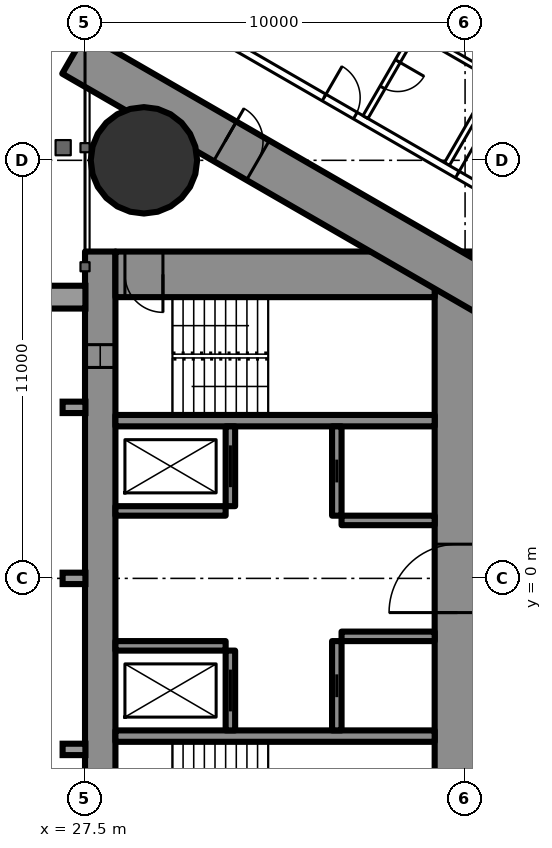
"""IFC4 building model, lengths in metres.
Left out: names, types, materials, properties, quantities, classifications, styles, units other than length and angle.
Written with IfcOpenShell. Run it as: python <this file> out.ifc"""

import sys

from ifc_helpers import new_model, si_unit, direction, frame, frame_2d, origin, origin_2d, place, context, subcontext, project, spatial, rectangle, circle, extrude, element, fill, save


model = new_model("IFC4")
c1 = context("Model", 3, precision=1e-05, world=origin(), true_north=direction((0.0, 1.0)))
c2 = subcontext(c1, "Body", "Model", "MODEL_VIEW")
j1 = project(units=[si_unit("LENGTHUNIT", "METRE"), si_unit("PLANEANGLEUNIT", "RADIAN")], contexts=[c1])
p1 = place(None, origin())
s1 = spatial("IfcSite", under=j1, at=p1, CompositionType="ELEMENT")
p2 = place(p1, origin())
s2 = spatial("IfcBuilding", under=s1, at=p2, CompositionType="ELEMENT")
p3 = place(p2, frame((0.0, 0.0, 184.3)))
s3 = spatial("IfcBuildingStorey", under=s2, at=p3, CompositionType="ELEMENT", Elevation=184.3)
p4 = place(p3, frame((29.05, 11.0, 0.0), z_axis=(0.0, 0.0, 1.0), x_axis=(1.0, 0.0, 0.0)))
e1 = element("IfcColumn", 1, at=p4, inside=s3, PredefinedType="COLUMN", context=c2, shape_type="SweptSolid", body=[
    extrude(circle(Radius=1.4, at=origin_2d()), origin(), (0.0, 0.0, 1.0), 3.5),
])
p5 = place(p3, frame((27.9, -8.6, 0.0), z_axis=(0.0, 0.0, 1.0), x_axis=(0.0, 1.0, 0.0)))
e2 = element("IfcWall", 2, at=p5, inside=s3, PredefinedType="SHEAR", context=c2, shape_type="SweptSolid", body=[
    extrude(rectangle(XDim=17.2, YDim=0.8, at=frame_2d((8.6, 0.0))), origin(), (0.0, 0.0, 1.0), 3.5),
])
p6 = place(p5, frame((2.45, 0.0, 0.6)))
e3 = element("IfcOpeningElement", 3, at=p6, cuts=e2, PredefinedType="OPENING", context=c2, shape_type="SweptSolid", body=[
    extrude(rectangle(XDim=0.6, YDim=2.1, at=frame_2d((0.3, 1.05))), frame((0.0, 0.41, 0.0), z_axis=(0.0, -1.0, 0.0), x_axis=(1.0, 0.0, 0.0)), (0.0, 0.0, 1.0), 0.82),
])
p7 = place(p5, frame((14.15, 0.0, 0.6)))
e4 = element("IfcOpeningElement", 4, at=p7, cuts=e2, PredefinedType="OPENING", context=c2, shape_type="SweptSolid", body=[
    extrude(rectangle(XDim=0.6, YDim=2.1, at=frame_2d((0.3, 1.05))), frame((0.0, 0.41, 0.0), z_axis=(0.0, -1.0, 0.0), x_axis=(1.0, 0.0, 0.0)), (0.0, 0.0, 1.0), 0.82),
])
p8 = place(p3, frame((37.3, -8.6, 0.0), z_axis=(0.0, 0.0, 1.0), x_axis=(0.0, 1.0, 0.0)))
e5 = element("IfcWall", 5, at=p8, inside=s3, PredefinedType="SHEAR", context=c2, shape_type="SweptSolid", body=[
    extrude(rectangle(XDim=17.2, YDim=1.2, at=frame_2d((8.6, 0.0))), origin(), (0.0, 0.0, 1.0), 3.5),
])
p9 = place(p8, frame((7.7, 0.0, 0.0)))
e6 = element("IfcOpeningElement", 6, at=p9, cuts=e5, PredefinedType="OPENING", context=c2, shape_type="SweptSolid", body=[
    extrude(rectangle(XDim=1.8, YDim=2.2, at=frame_2d((0.9, 1.1))), frame((0.0, 0.61, 0.0), z_axis=(0.0, -1.0, 0.0), x_axis=(1.0, 0.0, 0.0)), (0.0, 0.0, 1.0), 1.22),
])
p10 = place(p3, frame((28.3, 8.0, 0.0), z_axis=(0.0, 0.0, 1.0), x_axis=(1.0, 0.0, 0.0)))
e7 = element("IfcWall", 7, at=p10, inside=s3, PredefinedType="SHEAR", context=c2, shape_type="SweptSolid", body=[
    extrude(rectangle(XDim=8.4, YDim=1.2, at=frame_2d((4.2, 0.0))), origin(), (0.0, 0.0, 1.0), 3.5),
])
p11 = place(p10, frame((0.25, 0.0, 0.0)))
e8 = element("IfcOpeningElement", 8, at=p11, cuts=e7, PredefinedType="OPENING", context=c2, shape_type="SweptSolid", body=[
    extrude(rectangle(XDim=1.0, YDim=2.2, at=frame_2d((0.5, 1.1))), frame((0.0, 0.61, 0.0), z_axis=(0.0, -1.0, 0.0), x_axis=(1.0, 0.0, 0.0)), (0.0, 0.0, 1.0), 1.22),
])
for number, where, z_axis, x_axis in (
    (9, (28.3, -4.15, 0.0), (0.0, 0.0, 1.0), (1.0, 0.0, 0.0)),
    (10, (28.3, 4.15, 0.0), (0.0, 0.0, 1.0), (1.0, 0.0, 0.0)),
):
    element("IfcWall", number, at=place(p3, frame(where, z_axis=z_axis, x_axis=x_axis)), inside=s3, PredefinedType="SHEAR", context=c2, shape_type="SweptSolid", body=[
        extrude(rectangle(XDim=8.4, YDim=0.3, at=frame_2d((4.2, 0.0))), origin(), (0.0, 0.0, 1.0), 3.5),
    ])
p12 = place(p3, frame((31.325, -4.0, 0.0), z_axis=(0.0, 0.0, 1.0), x_axis=(0.0, 1.0, 0.0)))
e11 = element("IfcWall", 11, at=p12, inside=s3, PredefinedType="SHEAR", context=c2, shape_type="SweptSolid", body=[
    extrude(rectangle(XDim=2.1, YDim=0.25, at=frame_2d((1.05, 0.0))), origin(), (0.0, 0.0, 1.0), 3.5),
])
p13 = place(p12, frame((0.5, 0.0, 0.0)))
e12 = element("IfcOpeningElement", 12, at=p13, cuts=e11, PredefinedType="OPENING", context=c2, shape_type="SweptSolid", body=[
    extrude(rectangle(XDim=1.1, YDim=2.2, at=frame_2d((0.55, 1.1))), frame((0.0, 0.135, 0.0), z_axis=(0.0, -1.0, 0.0), x_axis=(1.0, 0.0, 0.0)), (0.0, 0.0, 1.0), 0.27),
])
p14 = place(p3, frame((34.125, -4.0, 0.0), z_axis=(0.0, 0.0, 1.0), x_axis=(0.0, 1.0, 0.0)))
e13 = element("IfcWall", 13, at=p14, inside=s3, PredefinedType="SHEAR", context=c2, shape_type="SweptSolid", body=[
    extrude(rectangle(XDim=2.35, YDim=0.25, at=frame_2d((1.175, 0.0))), origin(), (0.0, 0.0, 1.0), 3.5),
])
p15 = place(p14, frame((0.875, 0.0, 0.0)))
e14 = element("IfcOpeningElement", 14, at=p15, cuts=e13, PredefinedType="OPENING", context=c2, shape_type="SweptSolid", body=[
    extrude(rectangle(XDim=0.6, YDim=2.0, at=frame_2d((0.3, 1.0))), frame((0.0, 0.135, 0.0), z_axis=(0.0, -1.0, 0.0), x_axis=(1.0, 0.0, 0.0)), (0.0, 0.0, 1.0), 0.27),
])
p16 = place(p3, frame((28.3, -1.775, 0.0), z_axis=(0.0, 0.0, 1.0), x_axis=(1.0, 0.0, 0.0)))
e15 = element("IfcWall", 15, at=p16, inside=s3, PredefinedType="SHEAR", context=c2, shape_type="SweptSolid", body=[
    extrude(rectangle(XDim=2.9, YDim=0.25, at=frame_2d((1.45, 0.0))), origin(), (0.0, 0.0, 1.0), 3.5),
])
p17 = place(p3, frame((34.25, -1.525, 0.0), z_axis=(0.0, 0.0, 1.0), x_axis=(1.0, 0.0, 0.0)))
e16 = element("IfcWall", 16, at=p17, inside=s3, PredefinedType="SHEAR", context=c2, shape_type="SweptSolid", body=[
    extrude(rectangle(XDim=2.45, YDim=0.25, at=frame_2d((1.225, 0.0))), origin(), (0.0, 0.0, 1.0), 3.5),
])
p18 = place(p3, frame((31.325, 1.9, 0.0), z_axis=(0.0, 0.0, 1.0), x_axis=(0.0, 1.0, 0.0)))
e17 = element("IfcWall", 17, at=p18, inside=s3, PredefinedType="SHEAR", context=c2, shape_type="SweptSolid", body=[
    extrude(rectangle(XDim=2.1, YDim=0.25, at=frame_2d((1.05, 0.0))), origin(), (0.0, 0.0, 1.0), 3.5),
])
p19 = place(p18, frame((0.5, 0.0, 0.0)))
e18 = element("IfcOpeningElement", 18, at=p19, cuts=e17, PredefinedType="OPENING", context=c2, shape_type="SweptSolid", body=[
    extrude(rectangle(XDim=1.1, YDim=2.2, at=frame_2d((0.55, 1.1))), frame((0.0, 0.135, 0.0), z_axis=(0.0, -1.0, 0.0), x_axis=(1.0, 0.0, 0.0)), (0.0, 0.0, 1.0), 0.27),
])
p20 = place(p3, frame((34.125, 1.65, 0.0), z_axis=(0.0, 0.0, 1.0), x_axis=(0.0, 1.0, 0.0)))
e19 = element("IfcWall", 19, at=p20, inside=s3, PredefinedType="SHEAR", context=c2, shape_type="SweptSolid", body=[
    extrude(rectangle(XDim=2.35, YDim=0.25, at=frame_2d((1.175, 0.0))), origin(), (0.0, 0.0, 1.0), 3.5),
])
p21 = place(p20, frame((0.875, 0.0, 0.0)))
e20 = element("IfcOpeningElement", 20, at=p21, cuts=e19, PredefinedType="OPENING", context=c2, shape_type="SweptSolid", body=[
    extrude(rectangle(XDim=0.6, YDim=2.0, at=frame_2d((0.3, 1.0))), frame((0.0, 0.135, 0.0), z_axis=(0.0, -1.0, 0.0), x_axis=(1.0, 0.0, 0.0)), (0.0, 0.0, 1.0), 0.27),
])
p22 = place(p3, frame((28.3, 1.775, 0.0), z_axis=(0.0, 0.0, 1.0), x_axis=(1.0, 0.0, 0.0)))
e21 = element("IfcWall", 21, at=p22, inside=s3, PredefinedType="SHEAR", context=c2, shape_type="SweptSolid", body=[
    extrude(rectangle(XDim=2.9, YDim=0.25, at=frame_2d((1.45, 0.0))), origin(), (0.0, 0.0, 1.0), 3.5),
])
p23 = place(p3, frame((34.25, 1.525, 0.0), z_axis=(0.0, 0.0, 1.0), x_axis=(1.0, 0.0, 0.0)))
e22 = element("IfcWall", 22, at=p23, inside=s3, PredefinedType="SHEAR", context=c2, shape_type="SweptSolid", body=[
    extrude(rectangle(XDim=2.45, YDim=0.25, at=frame_2d((1.225, 0.0))), origin(), (0.0, 0.0, 1.0), 3.5),
])
p24 = place(p3, frame((27.2, -13.8, 0.0), z_axis=(0.0, 0.0, 1.0), x_axis=(0.866027159892, 0.499996958321, 0.0)))
e23 = element("IfcWall", 23, at=p24, inside=s3, PredefinedType="SHEAR", context=c2, shape_type="SweptSolid", body=[
    extrude(rectangle(XDim=27.947, YDim=1.2, at=frame_2d((13.973, 0.0))), origin(), (0.0, 0.0, 1.0), 3.5),
])
p25 = place(p24, frame((4.6, 0.0, 0.0)))
e24 = element("IfcOpeningElement", 24, at=p25, cuts=e23, PredefinedType="OPENING", context=c2, shape_type="SweptSolid", body=[
    extrude(rectangle(XDim=1.0, YDim=2.2, at=frame_2d((0.5, 1.1))), frame((0.0, 0.61, 0.0), z_axis=(0.0, -1.0, 0.0), x_axis=(1.0, 0.0, 0.0)), (0.0, 0.0, 1.0), 1.22),
])
p26 = place(p24, frame((13.395, 0.0, 0.0)))
e25 = element("IfcOpeningElement", 25, at=p26, cuts=e23, PredefinedType="OPENING", context=c2, shape_type="SweptSolid", body=[
    extrude(rectangle(XDim=1.8, YDim=2.2, at=frame_2d((0.9, 1.1))), frame((0.0, 0.61, 0.0), z_axis=(0.0, -1.0, 0.0), x_axis=(1.0, 0.0, 0.0)), (0.0, 0.0, 1.0), 1.22),
])
p27 = place(p3, frame((27.2, 13.8, 0.0), z_axis=(0.0, 0.0, 1.0), x_axis=(0.866024515034, -0.500001539357, 0.0)))
e26 = element("IfcWall", 26, at=p27, inside=s3, PredefinedType="SHEAR", context=c2, shape_type="SweptSolid", body=[
    extrude(rectangle(XDim=26.907, YDim=1.2, at=frame_2d((13.454, 0.0))), origin(), (0.0, 0.0, 1.0), 3.5),
])
p28 = place(p27, frame((4.6, 0.0, 0.0)))
e27 = element("IfcOpeningElement", 27, at=p28, cuts=e26, PredefinedType="OPENING", context=c2, shape_type="SweptSolid", body=[
    extrude(rectangle(XDim=1.0, YDim=2.2, at=frame_2d((0.5, 1.1))), frame((0.0, 0.61, 0.0), z_axis=(0.0, -1.0, 0.0), x_axis=(1.0, 0.0, 0.0)), (0.0, 0.0, 1.0), 1.22),
])
p29 = place(p27, frame((13.395, 0.0, 0.0)))
e28 = element("IfcOpeningElement", 28, at=p29, cuts=e26, PredefinedType="OPENING", context=c2, shape_type="SweptSolid", body=[
    extrude(rectangle(XDim=1.8, YDim=2.2, at=frame_2d((0.9, 1.1))), frame((0.0, 0.61, 0.0), z_axis=(0.0, -1.0, 0.0), x_axis=(1.0, 0.0, 0.0)), (0.0, 0.0, 1.0), 1.22),
])
p30 = place(p3, frame((37.022, 10.9, 0.0), z_axis=(0.0, 0.0, 1.0), x_axis=(0.499998620953, 0.866026199976, 0.0)))
e29 = element("IfcWall", 29, at=p30, inside=s3, PredefinedType="PARTITIONING", context=c2, shape_type="SweptSolid", body=[
    extrude(rectangle(XDim=9.77, YDim=0.15, at=frame_2d((4.885, 0.0))), origin(), (0.0, 0.0, 1.0), 3.25),
])
p31 = place(p3, frame((27.959, 16.017, 0.0), z_axis=(0.0, 0.0, 1.0), x_axis=(0.866027146794, -0.499996981007, 0.0)))
e30 = element("IfcWall", 30, at=p31, inside=s3, PredefinedType="PARTITIONING", context=c2, shape_type="SweptSolid", body=[
    extrude(rectangle(XDim=21.657, YDim=0.2, at=frame_2d((10.829, 0.0))), origin(), (0.0, 0.0, 1.0), 3.25),
])
p32 = place(p31, frame((17.741, 0.0, 0.0)))
e31 = element("IfcOpeningElement", 31, at=p32, cuts=e30, PredefinedType="OPENING", context=c2, shape_type="SweptSolid", body=[
    extrude(rectangle(XDim=0.95, YDim=2.2, at=frame_2d((0.475, 1.1))), frame((0.0, 0.11, 0.0), z_axis=(0.0, -1.0, 0.0), x_axis=(1.0, 0.0, 0.0)), (0.0, 0.0, 1.0), 0.22),
])
p33 = place(p31, frame((10.782, 0.0, 0.0)))
e32 = element("IfcOpeningElement", 32, at=p33, cuts=e30, PredefinedType="OPENING", context=c2, shape_type="SweptSolid", body=[
    extrude(rectangle(XDim=0.95, YDim=2.2, at=frame_2d((0.475, 1.1))), frame((0.0, 0.11, 0.0), z_axis=(0.0, -1.0, 0.0), x_axis=(1.0, 0.0, 0.0)), (0.0, 0.0, 1.0), 0.22),
])
p34 = place(p31, frame((6.732, 0.0, 0.0)))
e33 = element("IfcOpeningElement", 33, at=p34, cuts=e30, PredefinedType="OPENING", context=c2, shape_type="SweptSolid", body=[
    extrude(rectangle(XDim=0.95, YDim=2.2, at=frame_2d((0.475, 1.1))), frame((0.0, 0.11, 0.0), z_axis=(0.0, -1.0, 0.0), x_axis=(1.0, 0.0, 0.0)), (0.0, 0.0, 1.0), 0.22),
])
p35 = place(p31, frame((19.349, 0.0, 0.0)))
e34 = element("IfcOpeningElement", 34, at=p35, cuts=e30, PredefinedType="OPENING", context=c2, shape_type="SweptSolid", body=[
    extrude(rectangle(XDim=1.8, YDim=2.2, at=frame_2d((0.9, 1.1))), frame((0.0, 0.11, 0.0), z_axis=(0.0, -1.0, 0.0), x_axis=(1.0, 0.0, 0.0)), (0.0, 0.0, 1.0), 0.22),
])
p36 = place(p3, frame((27.959, -16.017, 0.0), z_axis=(0.0, 0.0, 1.0), x_axis=(0.866024180982, 0.50000211795, 0.0)))
e35 = element("IfcWall", 35, at=p36, inside=s3, PredefinedType="PARTITIONING", context=c2, shape_type="SweptSolid", body=[
    extrude(rectangle(XDim=23.375, YDim=0.2, at=frame_2d((11.688, 0.0))), origin(), (0.0, 0.0, 1.0), 3.25),
])
p37 = place(p36, frame((2.415, 0.0, 0.0)))
e36 = element("IfcOpeningElement", 36, at=p37, cuts=e35, PredefinedType="OPENING", context=c2, shape_type="SweptSolid", body=[
    extrude(rectangle(XDim=0.95, YDim=2.2, at=frame_2d((0.475, 1.1))), frame((0.0, 0.11, 0.0), z_axis=(0.0, -1.0, 0.0), x_axis=(1.0, 0.0, 0.0)), (0.0, 0.0, 1.0), 0.22),
])
p38 = place(p36, frame((9.215, 0.0, 0.0)))
e37 = element("IfcOpeningElement", 37, at=p38, cuts=e35, PredefinedType="OPENING", context=c2, shape_type="SweptSolid", body=[
    extrude(rectangle(XDim=1.0, YDim=2.2, at=frame_2d((0.5, 1.1))), frame((0.0, 0.11, 0.0), z_axis=(0.0, -1.0, 0.0), x_axis=(1.0, 0.0, 0.0)), (0.0, 0.0, 1.0), 0.22),
])
p39 = place(p36, frame((15.109, 0.0, 0.0)))
e38 = element("IfcOpeningElement", 38, at=p39, cuts=e35, PredefinedType="OPENING", context=c2, shape_type="SweptSolid", body=[
    extrude(rectangle(XDim=0.95, YDim=2.2, at=frame_2d((0.475, 1.1))), frame((0.0, 0.11, 0.0), z_axis=(0.0, -1.0, 0.0), x_axis=(1.0, 0.0, 0.0)), (0.0, 0.0, 1.0), 0.22),
])
p40 = place(p3, frame((36.114, 14.427, 0.0), z_axis=(0.0, 0.0, 1.0), x_axis=(0.86604923931, -0.499958713387, 0.0)))
e39 = element("IfcWall", 39, at=p40, inside=s3, PredefinedType="PARTITIONING", context=c2, shape_type="SweptSolid", body=[
    extrude(rectangle(XDim=2.475, YDim=0.15, at=frame_2d((1.237, 0.0))), origin(), (0.0, 0.0, 1.0), 3.25),
])
p41 = place(p3, frame((34.879, 12.138, 0.0), z_axis=(0.0, 0.0, 1.0), x_axis=(0.500006934395, 0.866021400173, 0.0)))
e40 = element("IfcWall", 40, at=p41, inside=s3, PredefinedType="PARTITIONING", context=c2, shape_type="SweptSolid", body=[
    extrude(rectangle(XDim=2.6, YDim=0.15, at=frame_2d((1.3, 0.0))), origin(), (0.0, 0.0, 1.0), 3.25),
])
p42 = place(p41, frame((0.9, 0.0, 0.0)))
e41 = element("IfcOpeningElement", 41, at=p42, cuts=e40, PredefinedType="OPENING", context=c2, shape_type="SweptSolid", body=[
    extrude(rectangle(XDim=0.8, YDim=2.2, at=frame_2d((0.4, 1.1))), frame((0.0, 0.085, 0.0), z_axis=(0.0, -1.0, 0.0), x_axis=(1.0, 0.0, 0.0)), (0.0, 0.0, 1.0), 0.17),
])
p43 = place(p33, origin())
e42 = element("IfcDoor", 42, at=p43, inside=s3, OperationType="SINGLE_SWING_LEFT", PredefinedType="DOOR", context=c2, shape_type="SweptSolid", body=[
    extrude(rectangle(XDim=0.95, YDim=2.2, at=frame_2d((0.475, 1.1))), frame((0.0, 0.025, 0.0), z_axis=(0.0, -1.0, 0.0), x_axis=(1.0, 0.0, 0.0)), (0.0, 0.0, 1.0), 0.05),
])
fill(e32, e42)
p44 = place(p42, origin())
e43 = element("IfcDoor", 43, at=p44, inside=s3, OperationType="SINGLE_SWING_RIGHT", PredefinedType="DOOR", context=c2, shape_type="SweptSolid", body=[
    extrude(rectangle(XDim=0.8, YDim=2.2, at=frame_2d((0.4, 1.1))), frame((0.0, 0.025, 0.0), z_axis=(0.0, -1.0, 0.0), x_axis=(1.0, 0.0, 0.0)), (0.0, 0.0, 1.0), 0.05),
])
fill(e41, e43)
p45 = place(p34, origin())
e44 = element("IfcDoor", 44, at=p45, inside=s3, OperationType="SINGLE_SWING_LEFT", PredefinedType="DOOR", context=c2, shape_type="SweptSolid", body=[
    extrude(rectangle(XDim=0.95, YDim=2.2, at=frame_2d((0.475, 1.1))), frame((0.0, 0.025, 0.0), z_axis=(0.0, -1.0, 0.0), x_axis=(1.0, 0.0, 0.0)), (0.0, 0.0, 1.0), 0.05),
])
fill(e33, e44)
p46 = place(p28, origin())
e45 = element("IfcDoor", 45, at=p46, inside=s3, OperationType="SINGLE_SWING_LEFT", PredefinedType="DOOR", context=c2, shape_type="SweptSolid", body=[
    extrude(rectangle(XDim=1.0, YDim=2.2, at=frame_2d((0.5, 1.1))), frame((0.0, 0.025, 0.0), z_axis=(0.0, -1.0, 0.0), x_axis=(1.0, 0.0, 0.0)), (0.0, 0.0, 1.0), 0.05),
])
fill(e27, e45)
p47 = place(p9, origin())
e46 = element("IfcDoor", 46, at=p47, inside=s3, OperationType="DOUBLE_DOOR_SINGLE_SWING", PredefinedType="DOOR", context=c2, shape_type="SweptSolid", body=[
    extrude(rectangle(XDim=1.8, YDim=2.2, at=frame_2d((0.9, 1.1))), frame((0.0, 0.025, 0.0), z_axis=(0.0, -1.0, 0.0), x_axis=(1.0, 0.0, 0.0)), (0.0, 0.0, 1.0), 0.05),
])
fill(e6, e46)
p48 = place(p11, origin())
e47 = element("IfcDoor", 47, at=p48, inside=s3, OperationType="SINGLE_SWING_RIGHT", PredefinedType="DOOR", context=c2, shape_type="SweptSolid", body=[
    extrude(rectangle(XDim=1.0, YDim=2.2, at=frame_2d((0.5, 1.1))), frame((0.0, 0.025, 0.0), z_axis=(0.0, -1.0, 0.0), x_axis=(1.0, 0.0, 0.0)), (0.0, 0.0, 1.0), 0.05),
])
fill(e8, e47)
p49 = place(p13, origin())
e48 = element("IfcDoor", 48, at=p49, inside=s3, OperationType="SLIDING_TO_LEFT", PredefinedType="USERDEFINED", context=c2, shape_type="SweptSolid", body=[
    extrude(rectangle(XDim=1.1, YDim=2.2, at=frame_2d((0.55, 1.1))), frame((0.0, 0.025, 0.0), z_axis=(0.0, -1.0, 0.0), x_axis=(1.0, 0.0, 0.0)), (0.0, 0.0, 1.0), 0.05),
])
fill(e12, e48)
p50 = place(p19, origin())
e49 = element("IfcDoor", 49, at=p50, inside=s3, OperationType="SLIDING_TO_LEFT", PredefinedType="USERDEFINED", context=c2, shape_type="SweptSolid", body=[
    extrude(rectangle(XDim=1.1, YDim=2.2, at=frame_2d((0.55, 1.1))), frame((0.0, 0.025, 0.0), z_axis=(0.0, -1.0, 0.0), x_axis=(1.0, 0.0, 0.0)), (0.0, 0.0, 1.0), 0.05),
])
fill(e18, e49)
p51 = place(p15, origin())
e50 = element("IfcDoor", 50, at=p51, inside=s3, OperationType="SLIDING_TO_LEFT", PredefinedType="DOOR", context=c2, shape_type="SweptSolid", body=[
    extrude(rectangle(XDim=0.6, YDim=2.0, at=frame_2d((0.3, 1.0))), frame((0.0, 0.025, 0.0), z_axis=(0.0, -1.0, 0.0), x_axis=(1.0, 0.0, 0.0)), (0.0, 0.0, 1.0), 0.05),
])
fill(e14, e50)
p52 = place(p21, origin())
e51 = element("IfcDoor", 51, at=p52, inside=s3, OperationType="SLIDING_TO_LEFT", PredefinedType="DOOR", context=c2, shape_type="SweptSolid", body=[
    extrude(rectangle(XDim=0.6, YDim=2.0, at=frame_2d((0.3, 1.0))), frame((0.0, 0.025, 0.0), z_axis=(0.0, -1.0, 0.0), x_axis=(1.0, 0.0, 0.0)), (0.0, 0.0, 1.0), 0.05),
])
fill(e20, e51)
p53 = place(p7, origin())
e52 = element("IfcWindow", 52, at=p53, inside=s3, PartitioningType="SINGLE_PANEL", PredefinedType="WINDOW", context=c2, shape_type="SweptSolid", body=[
    extrude(rectangle(XDim=0.6, YDim=2.1, at=frame_2d((0.3, 1.05))), frame((0.0, 0.03, 0.0), z_axis=(0.0, -1.0, 0.0), x_axis=(1.0, 0.0, 0.0)), (0.0, 0.0, 1.0), 0.06),
])
fill(e4, e52)
save(model, sys.argv[1])
